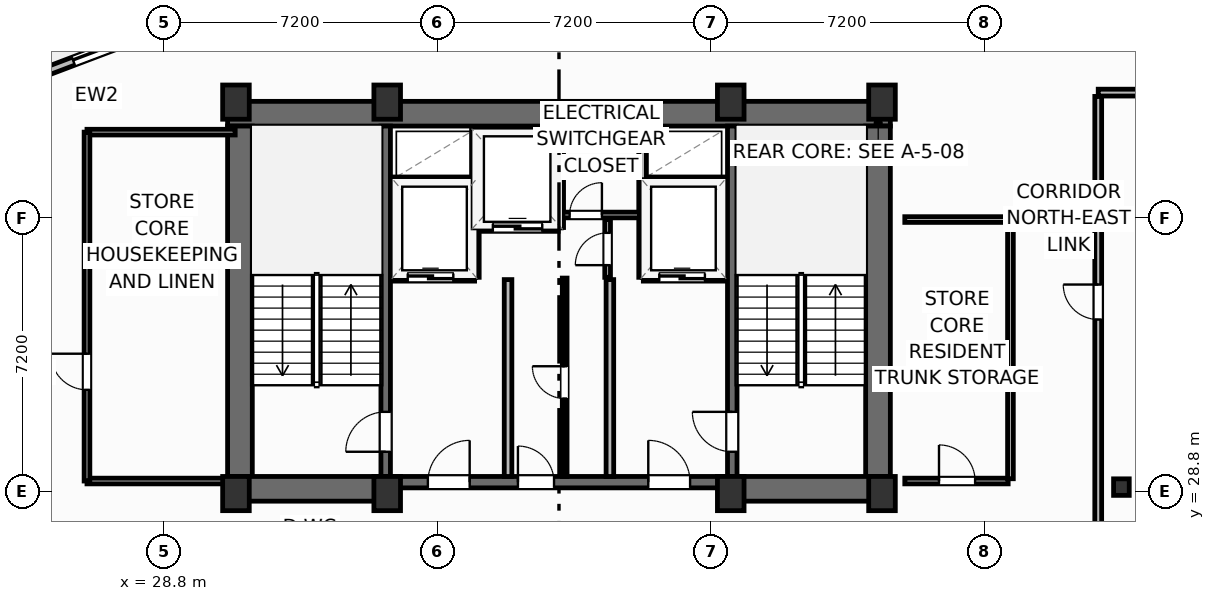
"""IFC4 building model, lengths in metres.
Left out: names, types, materials, properties, quantities, classifications, styles, units other than length and angle.
Written with IfcOpenShell. Run it as: python <this file> out.ifc"""

import sys

from ifc_helpers import new_model, si_unit, direction, frame, frame_2d, origin, origin_2d, place, context, subcontext, project, spatial, rectangle, i_section, extrude, element, fill, save


model = new_model("IFC4")
c1 = context("Model", 3, precision=1e-05, world=origin(), true_north=direction((0.0, 1.0)))
c2 = subcontext(c1, "Body", "Model", "MODEL_VIEW")
j1 = project(units=[si_unit("LENGTHUNIT", "METRE"), si_unit("PLANEANGLEUNIT", "RADIAN")], contexts=[c1])
p1 = place(None, origin())
s1 = spatial("IfcSite", under=j1, at=p1, CompositionType="ELEMENT")
p2 = place(p1, origin())
s2 = spatial("IfcBuilding", under=s1, at=p2, CompositionType="ELEMENT")
p3 = place(p2, frame((0.0, 0.0, 227.5)))
s3 = spatial("IfcBuildingStorey", under=s2, at=p3, CompositionType="ELEMENT", Elevation=227.5)
for number, where, z_axis, x_axis in (
    (1, (30.7, 28.75, 0.0), (0.0, 0.0, 1.0), (1.0, 0.0, 0.0)),
    (2, (34.68, 28.75, 0.0), (0.0, 0.0, 1.0), (1.0, 0.0, 0.0)),
    (3, (43.72, 28.75, 0.0), (0.0, 0.0, 1.0), (1.0, 0.0, 0.0)),
    (4, (47.7, 28.75, 0.0), (0.0, 0.0, 1.0), (1.0, 0.0, 0.0)),
    (5, (30.7, 39.05, 0.0), (0.0, 0.0, 1.0), (1.0, 0.0, 0.0)),
    (6, (34.68, 39.05, 0.0), (0.0, 0.0, 1.0), (1.0, 0.0, 0.0)),
    (7, (43.72, 39.05, 0.0), (0.0, 0.0, 1.0), (1.0, 0.0, 0.0)),
    (8, (47.7, 39.05, 0.0), (0.0, 0.0, 1.0), (1.0, 0.0, 0.0)),
):
    element("IfcColumn", number, at=place(p3, frame(where, z_axis=z_axis, x_axis=x_axis)), inside=s3, PredefinedType="COLUMN", context=c2, shape_type="SweptSolid", body=[
        extrude(rectangle(XDim=0.7, YDim=0.9, at=origin_2d()), origin(), (0.0, 0.0, 1.0), 3.7),
    ])
p4 = place(p3, frame((54.0, 28.92, 0.0), z_axis=(0.0, 0.0, 1.0), x_axis=(1.0, 0.0, 0.0)))
e9 = element("IfcColumn", 9, at=p4, inside=s3, PredefinedType="COLUMN", context=c2, shape_type="SweptSolid", body=[
    extrude(i_section(OverallWidth=0.412, OverallDepth=0.435, WebThickness=0.036, FlangeThickness=0.057, FilletRadius=0.025, at=origin_2d()), origin(), (0.0, 0.0, 1.0), 3.7),
])
p5 = place(p3, frame((30.48, 38.745, 0.0), z_axis=(0.0, 0.0, 1.0), x_axis=(1.0, 0.0, 0.0)))
e10 = element("IfcWall", 10, at=p5, inside=s3, PredefinedType="SHEAR", context=c2, shape_type="SweptSolid", body=[
    extrude(rectangle(XDim=17.44, YDim=0.65, at=frame_2d((8.72, 0.0))), origin(), (0.0, 0.0, 1.0), 3.45),
])
for number, where, z_axis, x_axis in (
    (11, (30.805, 29.2, 0.0), (0.0, 0.0, 1.0), (0.0, 1.0, 0.0)),
    (12, (47.595, 29.2, 0.0), (0.0, 0.0, 1.0), (0.0, 1.0, 0.0)),
):
    element("IfcWall", number, at=place(p3, frame(where, z_axis=z_axis, x_axis=x_axis)), inside=s3, PredefinedType="SHEAR", context=c2, shape_type="SweptSolid", body=[
        extrude(rectangle(XDim=9.22, YDim=0.65, at=frame_2d((4.61, 0.0))), origin(), (0.0, 0.0, 1.0), 3.45),
    ])
p6 = place(p3, frame((30.48, 28.875, 0.0), z_axis=(0.0, 0.0, 1.0), x_axis=(1.0, 0.0, 0.0)))
e13 = element("IfcWall", 13, at=p6, inside=s3, PredefinedType="SHEAR", context=c2, shape_type="SweptSolid", body=[
    extrude(rectangle(XDim=4.32, YDim=0.65, at=frame_2d((2.16, 0.0))), origin(), (0.0, 0.0, 1.0), 3.45),
])
p7 = place(p3, frame((43.6, 28.875, 0.0), z_axis=(0.0, 0.0, 1.0), x_axis=(1.0, 0.0, 0.0)))
e14 = element("IfcWall", 14, at=p7, inside=s3, PredefinedType="SHEAR", context=c2, shape_type="SweptSolid", body=[
    extrude(rectangle(XDim=4.32, YDim=0.65, at=frame_2d((2.16, 0.0))), origin(), (0.0, 0.0, 1.0), 3.45),
])
p8 = place(p3, frame((34.8, 29.05, 0.0), z_axis=(0.0, 0.0, 1.0), x_axis=(1.0, 0.0, 0.0)))
e15 = element("IfcWall", 15, at=p8, inside=s3, PredefinedType="SHEAR", context=c2, shape_type="SweptSolid", body=[
    extrude(rectangle(XDim=8.8, YDim=0.3, at=frame_2d((4.4, 0.0))), origin(), (0.0, 0.0, 1.0), 3.45),
])
p9 = place(p8, frame((0.95, 0.0, 0.0)))
e16 = element("IfcOpeningElement", 16, at=p9, cuts=e15, PredefinedType="OPENING", context=c2, shape_type="SweptSolid", body=[
    extrude(rectangle(XDim=1.1, YDim=2.15, at=frame_2d((0.55, 1.075))), frame((0.0, 0.16, 0.0), z_axis=(0.0, -1.0, 0.0), x_axis=(1.0, 0.0, 0.0)), (0.0, 0.0, 1.0), 0.32),
])
p10 = place(p8, frame((6.75, 0.0, 0.0)))
e17 = element("IfcOpeningElement", 17, at=p10, cuts=e15, PredefinedType="OPENING", context=c2, shape_type="SweptSolid", body=[
    extrude(rectangle(XDim=1.1, YDim=2.15, at=frame_2d((0.55, 1.075))), frame((0.0, 0.16, 0.0), z_axis=(0.0, -1.0, 0.0), x_axis=(1.0, 0.0, 0.0)), (0.0, 0.0, 1.0), 0.32),
])
p11 = place(p8, frame((3.32, 0.0, 0.0)))
e18 = element("IfcOpeningElement", 18, at=p11, cuts=e15, PredefinedType="OPENING", context=c2, shape_type="SweptSolid", body=[
    extrude(rectangle(XDim=0.95, YDim=2.15, at=frame_2d((0.475, 1.075))), frame((0.0, 0.16, 0.0), z_axis=(0.0, -1.0, 0.0), x_axis=(1.0, 0.0, 0.0)), (0.0, 0.0, 1.0), 0.32),
])
p12 = place(p3, frame((34.64, 29.2, 0.0), z_axis=(0.0, 0.0, 1.0), x_axis=(0.0, 1.0, 0.0)))
e19 = element("IfcWall", 19, at=p12, inside=s3, PredefinedType="SHEAR", context=c2, shape_type="SweptSolid", body=[
    extrude(rectangle(XDim=9.22, YDim=0.25, at=frame_2d((4.61, 0.0))), origin(), (0.0, 0.0, 1.0), 3.45),
])
p13 = place(p12, frame((0.65, 0.0, 0.0)))
e20 = element("IfcOpeningElement", 20, at=p13, cuts=e19, PredefinedType="OPENING", context=c2, shape_type="SweptSolid", body=[
    extrude(rectangle(XDim=1.05, YDim=2.15, at=frame_2d((0.525, 1.075))), frame((0.0, 0.135, 0.0), z_axis=(0.0, -1.0, 0.0), x_axis=(1.0, 0.0, 0.0)), (0.0, 0.0, 1.0), 0.27),
])
p14 = place(p3, frame((43.76, 29.2, 0.0), z_axis=(0.0, 0.0, 1.0), x_axis=(0.0, 1.0, 0.0)))
e21 = element("IfcWall", 21, at=p14, inside=s3, PredefinedType="SHEAR", context=c2, shape_type="SweptSolid", body=[
    extrude(rectangle(XDim=9.22, YDim=0.25, at=frame_2d((4.61, 0.0))), origin(), (0.0, 0.0, 1.0), 3.45),
])
p15 = place(p14, frame((0.65, 0.0, 0.0)))
e22 = element("IfcOpeningElement", 22, at=p15, cuts=e21, PredefinedType="OPENING", context=c2, shape_type="SweptSolid", body=[
    extrude(rectangle(XDim=1.05, YDim=2.15, at=frame_2d((0.525, 1.075))), frame((0.0, 0.135, 0.0), z_axis=(0.0, -1.0, 0.0), x_axis=(1.0, 0.0, 0.0)), (0.0, 0.0, 1.0), 0.27),
])
p16 = place(p3, frame((23.149, 38.887, 0.0), z_axis=(0.0, 0.0, 1.0), x_axis=(0.9352192676, 0.354069091436, 0.0)))
e23 = element("IfcWall", 23, at=p16, inside=s3, PredefinedType="SOLIDWALL", context=c2, shape_type="SweptSolid", body=[
    extrude(rectangle(XDim=6.0, YDim=0.22, at=frame_2d((3.0, 0.0))), origin(), (0.0, 0.0, 1.0), 2.73),
])
p17 = place(p16, frame((3.5, 0.0, 0.0)))
e24 = element("IfcOpeningElement", 24, at=p17, cuts=e23, PredefinedType="OPENING", context=c2, shape_type="SweptSolid", body=[
    extrude(rectangle(XDim=2.1, YDim=2.3, at=frame_2d((1.05, 1.15))), frame((0.0, 0.12, 0.0), z_axis=(0.0, -1.0, 0.0), x_axis=(1.0, 0.0, 0.0)), (0.0, 0.0, 1.0), 0.24),
])
p18 = place(p16, frame((0.55, 0.0, 0.75)))
e25 = element("IfcOpeningElement", 25, at=p18, cuts=e23, PredefinedType="OPENING", context=c2, shape_type="SweptSolid", body=[
    extrude(rectangle(XDim=1.85, YDim=1.75, at=frame_2d((0.925, 0.875))), frame((0.0, 0.12, 0.0), z_axis=(0.0, -1.0, 0.0), x_axis=(1.0, 0.0, 0.0)), (0.0, 0.0, 1.0), 0.24),
])
p19 = place(p3, frame((53.39, 27.53, 0.0), z_axis=(0.0, 0.0, 1.0), x_axis=(0.0, 1.0, 0.0)))
e26 = element("IfcWall", 26, at=p19, inside=s3, PredefinedType="PARTITIONING", context=c2, shape_type="SweptSolid", body=[
    extrude(rectangle(XDim=11.67, YDim=0.18, at=frame_2d((5.835, 0.0))), origin(), (0.0, 0.0, 1.0), 3.45),
])
p20 = place(p19, frame((5.8, 0.0, 0.0)))
e27 = element("IfcOpeningElement", 27, at=p20, cuts=e26, PredefinedType="OPENING", context=c2, shape_type="SweptSolid", body=[
    extrude(rectangle(XDim=0.92, YDim=2.05, at=frame_2d((0.46, 1.025))), frame((0.0, 0.1, 0.0), z_axis=(0.0, -1.0, 0.0), x_axis=(1.0, 0.0, 0.0)), (0.0, 0.0, 1.0), 0.2),
])
p21 = place(p3, frame((53.39, 39.3, 0.0), z_axis=(0.0, 0.0, 1.0), x_axis=(1.0, 0.0, 0.0)))
e28 = element("IfcWall", 28, at=p21, inside=s3, PredefinedType="PARTITIONING", context=c2, shape_type="SweptSolid", body=[
    extrude(rectangle(XDim=15.713, YDim=0.18, at=frame_2d((7.856, 0.0))), origin(), (0.0, 0.0, 1.0), 3.45),
])
for number, where, z_axis, x_axis in (
    (29, (37.86, 29.2, 0.0), (0.0, 0.0, 1.0), (0.0, 1.0, 0.0)),
    (30, (40.54, 29.2, 0.0), (0.0, 0.0, 1.0), (0.0, 1.0, 0.0)),
):
    element("IfcWall", number, at=place(p3, frame(where, z_axis=z_axis, x_axis=x_axis)), inside=s3, PredefinedType="PARTITIONING", context=c2, shape_type="SweptSolid", body=[
        extrude(rectangle(XDim=5.18, YDim=0.2, at=frame_2d((2.59, 0.0))), origin(), (0.0, 0.0, 1.0), 3.45),
    ])
p22 = place(p3, frame((34.8, 34.44, 0.0), z_axis=(0.0, 0.0, 1.0), x_axis=(1.0, 0.0, 0.0)))
e31 = element("IfcWall", 31, at=p22, inside=s3, PredefinedType="PARTITIONING", context=c2, shape_type="SweptSolid", body=[
    extrude(rectangle(XDim=2.18, YDim=0.2, at=frame_2d((1.09, 0.0))), origin(), (0.0, 0.0, 1.0), 3.45),
])
p23 = place(p22, frame((0.42, 0.0, 0.0)))
e32 = element("IfcOpeningElement", 32, at=p23, cuts=e31, PredefinedType="OPENING", context=c2, shape_type="SweptSolid", body=[
    extrude(rectangle(XDim=1.2, YDim=2.2, at=frame_2d((0.6, 1.1))), frame((0.0, 0.11, 0.0), z_axis=(0.0, -1.0, 0.0), x_axis=(1.0, 0.0, 0.0)), (0.0, 0.0, 1.0), 0.22),
])
p24 = place(p3, frame((34.8, 36.98, 0.0), z_axis=(0.0, 0.0, 1.0), x_axis=(1.0, 0.0, 0.0)))
e33 = element("IfcWall", 33, at=p24, inside=s3, PredefinedType="PARTITIONING", context=c2, shape_type="SweptSolid", body=[
    extrude(rectangle(XDim=2.18, YDim=0.2, at=frame_2d((1.09, 0.0))), origin(), (0.0, 0.0, 1.0), 3.45),
])
p25 = place(p3, frame((37.0, 34.44, 0.0), z_axis=(0.0, 0.0, 1.0), x_axis=(0.0, 1.0, 0.0)))
e34 = element("IfcWall", 34, at=p25, inside=s3, PredefinedType="PARTITIONING", context=c2, shape_type="SweptSolid", body=[
    extrude(rectangle(XDim=3.9, YDim=0.2, at=frame_2d((1.95, 0.0))), origin(), (0.0, 0.0, 1.0), 3.45),
])
p26 = place(p3, frame((41.42, 34.44, 0.0), z_axis=(0.0, 0.0, 1.0), x_axis=(1.0, 0.0, 0.0)))
e35 = element("IfcWall", 35, at=p26, inside=s3, PredefinedType="PARTITIONING", context=c2, shape_type="SweptSolid", body=[
    extrude(rectangle(XDim=2.18, YDim=0.2, at=frame_2d((1.09, 0.0))), origin(), (0.0, 0.0, 1.0), 3.45),
])
p27 = place(p26, frame((0.42, 0.0, 0.0)))
e36 = element("IfcOpeningElement", 36, at=p27, cuts=e35, PredefinedType="OPENING", context=c2, shape_type="SweptSolid", body=[
    extrude(rectangle(XDim=1.2, YDim=2.2, at=frame_2d((0.6, 1.1))), frame((0.0, 0.11, 0.0), z_axis=(0.0, -1.0, 0.0), x_axis=(1.0, 0.0, 0.0)), (0.0, 0.0, 1.0), 0.22),
])
p28 = place(p3, frame((41.42, 36.98, 0.0), z_axis=(0.0, 0.0, 1.0), x_axis=(1.0, 0.0, 0.0)))
e37 = element("IfcWall", 37, at=p28, inside=s3, PredefinedType="PARTITIONING", context=c2, shape_type="SweptSolid", body=[
    extrude(rectangle(XDim=2.18, YDim=0.2, at=frame_2d((1.09, 0.0))), origin(), (0.0, 0.0, 1.0), 3.45),
])
p29 = place(p3, frame((41.4, 34.44, 0.0), z_axis=(0.0, 0.0, 1.0), x_axis=(0.0, 1.0, 0.0)))
e38 = element("IfcWall", 38, at=p29, inside=s3, PredefinedType="PARTITIONING", context=c2, shape_type="SweptSolid", body=[
    extrude(rectangle(XDim=3.9, YDim=0.2, at=frame_2d((1.95, 0.0))), origin(), (0.0, 0.0, 1.0), 3.45),
])
p30 = place(p3, frame((37.06, 35.75, 0.0), z_axis=(0.0, 0.0, 1.0), x_axis=(1.0, 0.0, 0.0)))
e39 = element("IfcWall", 39, at=p30, inside=s3, PredefinedType="PARTITIONING", context=c2, shape_type="SweptSolid", body=[
    extrude(rectangle(XDim=2.12, YDim=0.2, at=frame_2d((1.06, 0.0))), origin(), (0.0, 0.0, 1.0), 3.45),
])
p31 = place(p30, frame((0.4, 0.0, 0.0)))
e40 = element("IfcOpeningElement", 40, at=p31, cuts=e39, PredefinedType="OPENING", context=c2, shape_type="SweptSolid", body=[
    extrude(rectangle(XDim=1.3, YDim=2.2, at=frame_2d((0.65, 1.1))), frame((0.0, 0.11, 0.0), z_axis=(0.0, -1.0, 0.0), x_axis=(1.0, 0.0, 0.0)), (0.0, 0.0, 1.0), 0.22),
])
p32 = place(p3, frame((39.22, 35.75, 0.0), z_axis=(0.0, 0.0, 1.0), x_axis=(0.0, 1.0, 0.0)))
e41 = element("IfcWall", 41, at=p32, inside=s3, PredefinedType="PARTITIONING", context=c2, shape_type="SweptSolid", body=[
    extrude(rectangle(XDim=2.59, YDim=0.2, at=frame_2d((1.295, 0.0))), origin(), (0.0, 0.0, 1.0), 3.45),
])
p33 = place(p3, frame((39.3, 36.08, 0.0), z_axis=(0.0, 0.0, 1.0), x_axis=(1.0, 0.0, 0.0)))
e42 = element("IfcWall", 42, at=p33, inside=s3, PredefinedType="PARTITIONING", context=c2, shape_type="SweptSolid", body=[
    extrude(rectangle(XDim=2.02, YDim=0.15, at=frame_2d((1.01, 0.0))), origin(), (0.0, 0.0, 1.0), 3.45),
])
p34 = place(p33, frame((0.18, 0.0, 0.0)))
e43 = element("IfcOpeningElement", 43, at=p34, cuts=e42, PredefinedType="OPENING", context=c2, shape_type="SweptSolid", body=[
    extrude(rectangle(XDim=0.85, YDim=2.05, at=frame_2d((0.425, 1.025))), frame((0.0, 0.085, 0.0), z_axis=(0.0, -1.0, 0.0), x_axis=(1.0, 0.0, 0.0)), (0.0, 0.0, 1.0), 0.17),
])
p35 = place(p3, frame((40.48, 34.44, 0.0), z_axis=(0.0, 0.0, 1.0), x_axis=(0.0, 1.0, 0.0)))
e44 = element("IfcWall", 44, at=p35, inside=s3, PredefinedType="PARTITIONING", context=c2, shape_type="SweptSolid", body=[
    extrude(rectangle(XDim=1.52, YDim=0.15, at=frame_2d((0.76, 0.0))), origin(), (0.0, 0.0, 1.0), 3.45),
])
p36 = place(p35, frame((0.32, 0.0, 0.0)))
e45 = element("IfcOpeningElement", 45, at=p36, cuts=e44, PredefinedType="OPENING", context=c2, shape_type="SweptSolid", body=[
    extrude(rectangle(XDim=0.85, YDim=2.05, at=frame_2d((0.425, 1.025))), frame((0.0, 0.085, 0.0), z_axis=(0.0, -1.0, 0.0), x_axis=(1.0, 0.0, 0.0)), (0.0, 0.0, 1.0), 0.17),
])
p37 = place(p3, frame((39.35, 29.2, 0.0), z_axis=(0.0, 0.0, 1.0), x_axis=(0.0, 1.0, 0.0)))
e46 = element("IfcWall", 46, at=p37, inside=s3, PredefinedType="PARTITIONING", context=c2, shape_type="SweptSolid", body=[
    extrude(rectangle(XDim=5.22, YDim=0.125, at=frame_2d((2.61, 0.0))), origin(), (0.0, 0.0, 1.0), 3.45),
])
p38 = place(p37, frame((2.05, 0.0, 0.0)))
e47 = element("IfcOpeningElement", 47, at=p38, cuts=e46, PredefinedType="OPENING", context=c2, shape_type="SweptSolid", body=[
    extrude(rectangle(XDim=0.85, YDim=2.05, at=frame_2d((0.425, 1.025))), frame((0.0, 0.073, 0.0), z_axis=(0.0, -1.0, 0.0), x_axis=(1.0, 0.0, 0.0)), (0.0, 0.0, 1.0), 0.145),
])
p39 = place(p3, frame((26.78, 29.08, 0.0), z_axis=(0.0, 0.0, 1.0), x_axis=(1.0, 0.0, 0.0)))
e48 = element("IfcWall", 48, at=p39, inside=s3, PredefinedType="PARTITIONING", context=c2, shape_type="SweptSolid", body=[
    extrude(rectangle(XDim=3.7, YDim=0.15, at=frame_2d((1.85, 0.0))), origin(), (0.0, 0.0, 1.0), 3.45),
])
p40 = place(p3, frame((26.78, 38.26, 0.0), z_axis=(0.0, 0.0, 1.0), x_axis=(1.0, 0.0, 0.0)))
e49 = element("IfcWall", 49, at=p40, inside=s3, PredefinedType="PARTITIONING", context=c2, shape_type="SweptSolid", body=[
    extrude(rectangle(XDim=3.9, YDim=0.15, at=frame_2d((1.95, 0.0))), origin(), (0.0, 0.0, 1.0), 3.45),
])
p41 = place(p3, frame((26.78, 29.08, 0.0), z_axis=(0.0, 0.0, 1.0), x_axis=(0.0, 1.0, 0.0)))
e50 = element("IfcWall", 50, at=p41, inside=s3, PredefinedType="PARTITIONING", context=c2, shape_type="SweptSolid", body=[
    extrude(rectangle(XDim=9.18, YDim=0.15, at=frame_2d((4.59, 0.0))), origin(), (0.0, 0.0, 1.0), 3.45),
])
p42 = place(p41, frame((2.4, 0.0, 0.0)))
e51 = element("IfcOpeningElement", 51, at=p42, cuts=e50, PredefinedType="OPENING", context=c2, shape_type="SweptSolid", body=[
    extrude(rectangle(XDim=0.95, YDim=2.05, at=frame_2d((0.475, 1.025))), frame((0.0, 0.085, 0.0), z_axis=(0.0, -1.0, 0.0), x_axis=(1.0, 0.0, 0.0)), (0.0, 0.0, 1.0), 0.17),
])
p43 = place(p3, frame((48.3, 29.08, 0.0), z_axis=(0.0, 0.0, 1.0), x_axis=(1.0, 0.0, 0.0)))
e52 = element("IfcWall", 52, at=p43, inside=s3, PredefinedType="PARTITIONING", context=c2, shape_type="SweptSolid", body=[
    extrude(rectangle(XDim=2.72, YDim=0.15, at=frame_2d((1.36, 0.0))), origin(), (0.0, 0.0, 1.0), 2.662),
])
p44 = place(p43, frame((0.9, 0.0, 0.0)))
e53 = element("IfcOpeningElement", 53, at=p44, cuts=e52, PredefinedType="OPENING", context=c2, shape_type="SweptSolid", body=[
    extrude(rectangle(XDim=0.95, YDim=2.05, at=frame_2d((0.475, 1.025))), frame((0.0, 0.085, 0.0), z_axis=(0.0, -1.0, 0.0), x_axis=(1.0, 0.0, 0.0)), (0.0, 0.0, 1.0), 0.17),
])
p45 = place(p3, frame((48.3, 35.96, 0.0), z_axis=(0.0, 0.0, 1.0), x_axis=(1.0, 0.0, 0.0)))
e54 = element("IfcWall", 54, at=p45, inside=s3, PredefinedType="PARTITIONING", context=c2, shape_type="SweptSolid", body=[
    extrude(rectangle(XDim=2.72, YDim=0.15, at=frame_2d((1.36, 0.0))), origin(), (0.0, 0.0, 1.0), 3.45),
])
p46 = place(p3, frame((51.08, 29.14, 0.0), z_axis=(0.0, 0.0, 1.0), x_axis=(0.0, 1.0, 0.0)))
e55 = element("IfcWall", 55, at=p46, inside=s3, PredefinedType="PARTITIONING", context=c2, shape_type="SweptSolid", body=[
    extrude(rectangle(XDim=6.76, YDim=0.15, at=frame_2d((3.38, 0.0))), origin(), (0.0, 0.0, 1.0), 3.45),
])
p47 = place(p17, origin())
e56 = element("IfcDoor", 56, at=p47, inside=s3, OperationType="SLIDING_TO_LEFT", PredefinedType="DOOR", context=c2, shape_type="SweptSolid", body=[
    extrude(rectangle(XDim=2.1, YDim=2.3, at=frame_2d((1.05, 1.15))), frame((0.0, 0.025, 0.0), z_axis=(0.0, -1.0, 0.0), x_axis=(1.0, 0.0, 0.0)), (0.0, 0.0, 1.0), 0.05),
])
fill(e24, e56)
p48 = place(p20, origin())
e57 = element("IfcDoor", 57, at=p48, inside=s3, OperationType="SINGLE_SWING_RIGHT", PredefinedType="DOOR", context=c2, shape_type="SweptSolid", body=[
    extrude(rectangle(XDim=0.92, YDim=2.05, at=frame_2d((0.46, 1.025))), frame((0.0, 0.025, 0.0), z_axis=(0.0, -1.0, 0.0), x_axis=(1.0, 0.0, 0.0)), (0.0, 0.0, 1.0), 0.05),
])
fill(e27, e57)
p49 = place(p13, origin())
e58 = element("IfcDoor", 58, at=p49, inside=s3, OperationType="SINGLE_SWING_LEFT", PredefinedType="DOOR", context=c2, shape_type="SweptSolid", body=[
    extrude(rectangle(XDim=1.05, YDim=2.15, at=frame_2d((0.525, 1.075))), frame((0.0, 0.025, 0.0), z_axis=(0.0, -1.0, 0.0), x_axis=(1.0, 0.0, 0.0)), (0.0, 0.0, 1.0), 0.05),
])
fill(e20, e58)
p50 = place(p15, origin())
e59 = element("IfcDoor", 59, at=p50, inside=s3, OperationType="SINGLE_SWING_RIGHT", PredefinedType="DOOR", context=c2, shape_type="SweptSolid", body=[
    extrude(rectangle(XDim=1.05, YDim=2.15, at=frame_2d((0.525, 1.075))), frame((0.0, 0.025, 0.0), z_axis=(0.0, -1.0, 0.0), x_axis=(1.0, 0.0, 0.0)), (0.0, 0.0, 1.0), 0.05),
])
fill(e22, e59)
p51 = place(p9, origin())
e60 = element("IfcDoor", 60, at=p51, inside=s3, OperationType="SINGLE_SWING_RIGHT", PredefinedType="DOOR", context=c2, shape_type="SweptSolid", body=[
    extrude(rectangle(XDim=1.1, YDim=2.15, at=frame_2d((0.55, 1.075))), frame((0.0, 0.025, 0.0), z_axis=(0.0, -1.0, 0.0), x_axis=(1.0, 0.0, 0.0)), (0.0, 0.0, 1.0), 0.05),
])
fill(e16, e60)
p52 = place(p10, origin())
e61 = element("IfcDoor", 61, at=p52, inside=s3, OperationType="SINGLE_SWING_LEFT", PredefinedType="DOOR", context=c2, shape_type="SweptSolid", body=[
    extrude(rectangle(XDim=1.1, YDim=2.15, at=frame_2d((0.55, 1.075))), frame((0.0, 0.025, 0.0), z_axis=(0.0, -1.0, 0.0), x_axis=(1.0, 0.0, 0.0)), (0.0, 0.0, 1.0), 0.05),
])
fill(e17, e61)
p53 = place(p23, origin())
e62 = element("IfcDoor", 62, at=p53, inside=s3, OperationType="SLIDING_TO_LEFT", PredefinedType="DOOR", context=c2, shape_type="SweptSolid", body=[
    extrude(rectangle(XDim=1.2, YDim=2.2, at=frame_2d((0.6, 1.1))), frame((0.0, 0.025, 0.0), z_axis=(0.0, -1.0, 0.0), x_axis=(1.0, 0.0, 0.0)), (0.0, 0.0, 1.0), 0.05),
])
fill(e32, e62)
p54 = place(p27, origin())
e63 = element("IfcDoor", 63, at=p54, inside=s3, OperationType="SLIDING_TO_LEFT", PredefinedType="DOOR", context=c2, shape_type="SweptSolid", body=[
    extrude(rectangle(XDim=1.2, YDim=2.2, at=frame_2d((0.6, 1.1))), frame((0.0, 0.025, 0.0), z_axis=(0.0, -1.0, 0.0), x_axis=(1.0, 0.0, 0.0)), (0.0, 0.0, 1.0), 0.05),
])
fill(e36, e63)
p55 = place(p31, origin())
e64 = element("IfcDoor", 64, at=p55, inside=s3, OperationType="SLIDING_TO_LEFT", PredefinedType="DOOR", context=c2, shape_type="SweptSolid", body=[
    extrude(rectangle(XDim=1.3, YDim=2.2, at=frame_2d((0.65, 1.1))), frame((0.0, 0.025, 0.0), z_axis=(0.0, -1.0, 0.0), x_axis=(1.0, 0.0, 0.0)), (0.0, 0.0, 1.0), 0.05),
])
fill(e40, e64)
p56 = place(p34, origin())
e65 = element("IfcDoor", 65, at=p56, inside=s3, OperationType="SINGLE_SWING_RIGHT", PredefinedType="DOOR", context=c2, shape_type="SweptSolid", body=[
    extrude(rectangle(XDim=0.85, YDim=2.05, at=frame_2d((0.425, 1.025))), frame((0.0, 0.025, 0.0), z_axis=(0.0, -1.0, 0.0), x_axis=(1.0, 0.0, 0.0)), (0.0, 0.0, 1.0), 0.05),
])
fill(e43, e65)
p57 = place(p36, origin())
e66 = element("IfcDoor", 66, at=p57, inside=s3, OperationType="SINGLE_SWING_LEFT", PredefinedType="DOOR", context=c2, shape_type="SweptSolid", body=[
    extrude(rectangle(XDim=0.85, YDim=2.05, at=frame_2d((0.425, 1.025))), frame((0.0, 0.025, 0.0), z_axis=(0.0, -1.0, 0.0), x_axis=(1.0, 0.0, 0.0)), (0.0, 0.0, 1.0), 0.05),
])
fill(e45, e66)
p58 = place(p38, origin())
e67 = element("IfcDoor", 67, at=p58, inside=s3, OperationType="SINGLE_SWING_RIGHT", PredefinedType="DOOR", context=c2, shape_type="SweptSolid", body=[
    extrude(rectangle(XDim=0.85, YDim=2.05, at=frame_2d((0.425, 1.025))), frame((0.0, 0.025, 0.0), z_axis=(0.0, -1.0, 0.0), x_axis=(1.0, 0.0, 0.0)), (0.0, 0.0, 1.0), 0.05),
])
fill(e47, e67)
p59 = place(p11, origin())
e68 = element("IfcDoor", 68, at=p59, inside=s3, OperationType="SINGLE_SWING_LEFT", PredefinedType="DOOR", context=c2, shape_type="SweptSolid", body=[
    extrude(rectangle(XDim=0.95, YDim=2.15, at=frame_2d((0.475, 1.075))), frame((0.0, 0.025, 0.0), z_axis=(0.0, -1.0, 0.0), x_axis=(1.0, 0.0, 0.0)), (0.0, 0.0, 1.0), 0.05),
])
fill(e18, e68)
p60 = place(p42, origin())
e69 = element("IfcDoor", 69, at=p60, inside=s3, OperationType="SINGLE_SWING_RIGHT", PredefinedType="DOOR", context=c2, shape_type="SweptSolid", body=[
    extrude(rectangle(XDim=0.95, YDim=2.05, at=frame_2d((0.475, 1.025))), frame((0.0, 0.025, 0.0), z_axis=(0.0, -1.0, 0.0), x_axis=(1.0, 0.0, 0.0)), (0.0, 0.0, 1.0), 0.05),
])
fill(e51, e69)
p61 = place(p44, origin())
e70 = element("IfcDoor", 70, at=p61, inside=s3, OperationType="SINGLE_SWING_LEFT", PredefinedType="DOOR", context=c2, shape_type="SweptSolid", body=[
    extrude(rectangle(XDim=0.95, YDim=2.05, at=frame_2d((0.475, 1.025))), frame((0.0, 0.025, 0.0), z_axis=(0.0, -1.0, 0.0), x_axis=(1.0, 0.0, 0.0)), (0.0, 0.0, 1.0), 0.05),
])
fill(e53, e70)
save(model, sys.argv[1])
